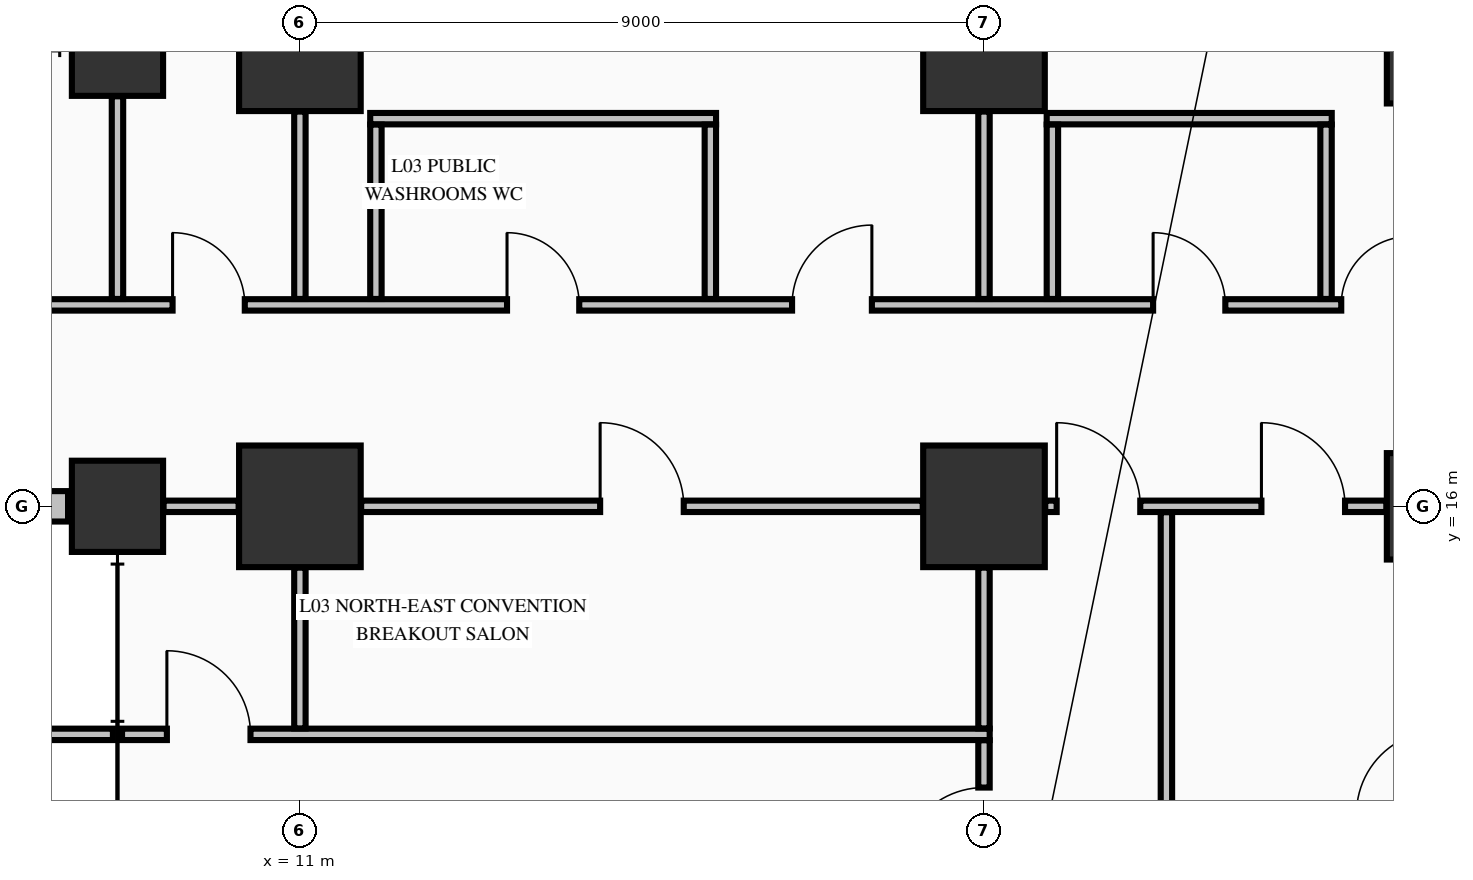
"""IFC4 building model, lengths in metres.
Left out: names, types, materials, properties, quantities, classifications, styles, units other than length and angle.
Written with IfcOpenShell. Run it as: python <this file> out.ifc"""

import sys

from ifc_helpers import new_model, si_unit, direction, frame, frame_2d, origin, origin_2d, place, context, subcontext, project, spatial, rectangle, extrude, element, fill, save


model = new_model("IFC4")
c1 = context("Model", 3, precision=1e-05, world=origin(), true_north=direction((0.0, 1.0)))
c2 = subcontext(c1, "Body", "Model", "MODEL_VIEW")
j1 = project(units=[si_unit("LENGTHUNIT", "METRE"), si_unit("PLANEANGLEUNIT", "RADIAN")], contexts=[c1])
p1 = place(None, origin())
s1 = spatial("IfcSite", under=j1, at=p1, CompositionType="ELEMENT")
p2 = place(p1, origin())
s2 = spatial("IfcBuilding", under=s1, at=p2, CompositionType="ELEMENT")
p3 = place(p2, frame((0.0, 0.0, 16.32)))
s3 = spatial("IfcBuildingStorey", under=s2, at=p3, CompositionType="ELEMENT", Elevation=16.32)
for number, where, z_axis, x_axis in (
    (1, (11.0, 16.0, 0.0), (0.0, 0.0, 1.0), (1.0, 0.0, 0.0)),
    (2, (11.0, 22.0, 0.0), (0.0, 0.0, 1.0), (1.0, 0.0, 0.0)),
    (3, (20.0, 16.0, 0.0), (0.0, 0.0, 1.0), (1.0, 0.0, 0.0)),
    (4, (20.0, 22.0, 0.0), (0.0, 0.0, 1.0), (1.0, 0.0, 0.0)),
):
    element("IfcColumn", number, at=place(p3, frame(where, z_axis=z_axis, x_axis=x_axis)), inside=s3, PredefinedType="COLUMN", context=c2, shape_type="SweptSolid", body=[
        extrude(rectangle(XDim=1.6, YDim=1.6, at=origin_2d()), origin(), (0.0, 0.0, 1.0), 4.99),
    ])
for number, where, z_axis, x_axis in (
    (5, (26.0, 16.0, 0.0), (0.0, 0.0, 1.0), (1.0, 0.0, 0.0)),
    (6, (26.0, 22.0, 0.0), (0.0, 0.0, 1.0), (1.0, 0.0, 0.0)),
):
    element("IfcColumn", number, at=place(p3, frame(where, z_axis=z_axis, x_axis=x_axis)), inside=s3, PredefinedType="COLUMN", context=c2, shape_type="SweptSolid", body=[
        extrude(rectangle(XDim=1.4, YDim=1.4, at=origin_2d()), origin(), (0.0, 0.0, 1.0), 4.99),
    ])
for number, where, z_axis, x_axis in (
    (7, (8.6, 16.0, 0.0), (0.0, 0.0, 1.0), (1.0, 0.0, 0.0)),
    (8, (8.6, 22.0, 0.0), (0.0, 0.0, 1.0), (1.0, 0.0, 0.0)),
):
    element("IfcColumn", number, at=place(p3, frame(where, z_axis=z_axis, x_axis=x_axis)), inside=s3, PredefinedType="COLUMN", context=c2, shape_type="SweptSolid", body=[
        extrude(rectangle(XDim=1.2, YDim=1.2, at=origin_2d()), origin(), (0.0, 0.0, 1.0), 4.99),
    ])
p4 = place(p3, frame((0.73, 16.0, 0.0), z_axis=(0.0, 0.0, 1.0), x_axis=(1.0, 0.0, 0.0)))
e9 = element("IfcWall", 9, at=p4, inside=s3, PredefinedType="STANDARD", context=c2, shape_type="SweptSolid", body=[
    extrude(rectangle(XDim=7.22, YDim=0.4, at=frame_2d((3.61, 0.0))), origin(), (0.0, 0.0, 1.0), 3.332),
])
p5 = place(p3, frame((-8.54, 13.0, 0.0), z_axis=(0.0, 0.0, 1.0), x_axis=(1.0, 0.0, 0.0)))
e10 = element("IfcWall", 10, at=p5, inside=s3, PredefinedType="PARTITIONING", context=c2, shape_type="SweptSolid", body=[
    extrude(rectangle(XDim=17.08, YDim=0.15, at=frame_2d((8.54, 0.0))), origin(), (0.0, 0.0, 1.0), 4.99),
])
p6 = place(p3, frame((8.66, 13.0, 0.0), z_axis=(0.0, 0.0, 1.0), x_axis=(1.0, 0.0, 0.0)))
e11 = element("IfcWall", 11, at=p6, inside=s3, PredefinedType="PARTITIONING", context=c2, shape_type="SweptSolid", body=[
    extrude(rectangle(XDim=11.415, YDim=0.15, at=frame_2d((5.708, 0.0))), origin(), (0.0, 0.0, 1.0), 4.99),
])
p7 = place(p6, frame((0.59, 0.0, 0.0)))
e12 = element("IfcOpeningElement", 12, at=p7, cuts=e11, PredefinedType="OPENING", context=c2, shape_type="SweptSolid", body=[
    extrude(rectangle(XDim=1.1, YDim=2.15, at=frame_2d((0.55, 1.075))), frame((0.0, 0.085, 0.0), z_axis=(0.0, -1.0, 0.0), x_axis=(1.0, 0.0, 0.0)), (0.0, 0.0, 1.0), 0.17),
])
p8 = place(p3, frame((9.206, 16.0, 0.0), z_axis=(0.0, 0.0, 1.0), x_axis=(1.0, 0.0, 0.0)))
e13 = element("IfcWall", 13, at=p8, inside=s3, PredefinedType="PARTITIONING", context=c2, shape_type="SweptSolid", body=[
    extrude(rectangle(XDim=0.988, YDim=0.15, at=frame_2d((0.494, 0.0))), origin(), (0.0, 0.0, 1.0), 3.332),
])
p9 = place(p3, frame((11.806, 16.0, 0.0), z_axis=(0.0, 0.0, 1.0), x_axis=(1.0, 0.0, 0.0)))
e14 = element("IfcWall", 14, at=p9, inside=s3, PredefinedType="PARTITIONING", context=c2, shape_type="SweptSolid", body=[
    extrude(rectangle(XDim=7.388, YDim=0.15, at=frame_2d((3.694, 0.0))), origin(), (0.0, 0.0, 1.0), 3.332),
])
p10 = place(p9, frame((3.144, 0.0, 0.0)))
e15 = element("IfcOpeningElement", 15, at=p10, cuts=e14, PredefinedType="OPENING", context=c2, shape_type="SweptSolid", body=[
    extrude(rectangle(XDim=1.1, YDim=2.15, at=frame_2d((0.55, 1.075))), frame((0.0, 0.085, 0.0), z_axis=(0.0, -1.0, 0.0), x_axis=(1.0, 0.0, 0.0)), (0.0, 0.0, 1.0), 0.17),
])
p11 = place(p3, frame((20.806, 16.0, 0.0), z_axis=(0.0, 0.0, 1.0), x_axis=(1.0, 0.0, 0.0)))
e16 = element("IfcWall", 16, at=p11, inside=s3, PredefinedType="PARTITIONING", context=c2, shape_type="SweptSolid", body=[
    extrude(rectangle(XDim=4.488, YDim=0.15, at=frame_2d((2.244, 0.0))), origin(), (0.0, 0.0, 1.0), 3.332),
])
p12 = place(p11, frame((0.15, 0.0, 0.0)))
e17 = element("IfcOpeningElement", 17, at=p12, cuts=e16, PredefinedType="OPENING", context=c2, shape_type="SweptSolid", body=[
    extrude(rectangle(XDim=1.1, YDim=2.15, at=frame_2d((0.55, 1.075))), frame((0.0, 0.085, 0.0), z_axis=(0.0, -1.0, 0.0), x_axis=(1.0, 0.0, 0.0)), (0.0, 0.0, 1.0), 0.17),
])
p13 = place(p11, frame((2.844, 0.0, 0.0)))
e18 = element("IfcOpeningElement", 18, at=p13, cuts=e16, PredefinedType="OPENING", context=c2, shape_type="SweptSolid", body=[
    extrude(rectangle(XDim=1.1, YDim=2.15, at=frame_2d((0.55, 1.075))), frame((0.0, 0.085, 0.0), z_axis=(0.0, -1.0, 0.0), x_axis=(1.0, 0.0, 0.0)), (0.0, 0.0, 1.0), 0.17),
])
p14 = place(p3, frame((-33.835, 18.65, 0.0), z_axis=(0.0, 0.0, 1.0), x_axis=(1.0, 0.0, 0.0)))
e19 = element("IfcWall", 19, at=p14, inside=s3, PredefinedType="PARTITIONING", context=c2, shape_type="SweptSolid", body=[
    extrude(rectangle(XDim=63.685, YDim=0.15, at=frame_2d((31.843, 0.0))), origin(), (0.0, 0.0, 1.0), 4.99),
])
p15 = place(p14, frame((1.285, 0.0, 0.0)))
e20 = element("IfcOpeningElement", 20, at=p15, cuts=e19, PredefinedType="OPENING", context=c2, shape_type="SweptSolid", body=[
    extrude(rectangle(XDim=1.1, YDim=2.15, at=frame_2d((0.55, 1.075))), frame((0.0, 0.085, 0.0), z_axis=(0.0, -1.0, 0.0), x_axis=(1.0, 0.0, 0.0)), (0.0, 0.0, 1.0), 0.17),
])
p16 = place(p14, frame((5.285, 0.0, 0.0)))
e21 = element("IfcOpeningElement", 21, at=p16, cuts=e19, PredefinedType="OPENING", context=c2, shape_type="SweptSolid", body=[
    extrude(rectangle(XDim=1.1, YDim=2.15, at=frame_2d((0.55, 1.075))), frame((0.0, 0.085, 0.0), z_axis=(0.0, -1.0, 0.0), x_axis=(1.0, 0.0, 0.0)), (0.0, 0.0, 1.0), 0.17),
])
p17 = place(p14, frame((8.785, 0.0, 0.0)))
e22 = element("IfcOpeningElement", 22, at=p17, cuts=e19, PredefinedType="OPENING", context=c2, shape_type="SweptSolid", body=[
    extrude(rectangle(XDim=1.1, YDim=2.15, at=frame_2d((0.55, 1.075))), frame((0.0, 0.085, 0.0), z_axis=(0.0, -1.0, 0.0), x_axis=(1.0, 0.0, 0.0)), (0.0, 0.0, 1.0), 0.17),
])
p18 = place(p14, frame((11.785, 0.0, 0.0)))
e23 = element("IfcOpeningElement", 23, at=p18, cuts=e19, PredefinedType="OPENING", context=c2, shape_type="SweptSolid", body=[
    extrude(rectangle(XDim=1.1, YDim=2.15, at=frame_2d((0.55, 1.075))), frame((0.0, 0.085, 0.0), z_axis=(0.0, -1.0, 0.0), x_axis=(1.0, 0.0, 0.0)), (0.0, 0.0, 1.0), 0.17),
])
p19 = place(p14, frame((15.535, 0.0, 0.0)))
e24 = element("IfcOpeningElement", 24, at=p19, cuts=e19, PredefinedType="OPENING", context=c2, shape_type="SweptSolid", body=[
    extrude(rectangle(XDim=1.1, YDim=2.15, at=frame_2d((0.55, 1.075))), frame((0.0, 0.085, 0.0), z_axis=(0.0, -1.0, 0.0), x_axis=(1.0, 0.0, 0.0)), (0.0, 0.0, 1.0), 0.17),
])
p20 = place(p14, frame((20.035, 0.0, 0.0)))
e25 = element("IfcOpeningElement", 25, at=p20, cuts=e19, PredefinedType="OPENING", context=c2, shape_type="SweptSolid", body=[
    extrude(rectangle(XDim=1.1, YDim=2.15, at=frame_2d((0.55, 1.075))), frame((0.0, 0.085, 0.0), z_axis=(0.0, -1.0, 0.0), x_axis=(1.0, 0.0, 0.0)), (0.0, 0.0, 1.0), 0.17),
])
p21 = place(p14, frame((23.56, 0.0, 0.0)))
e26 = element("IfcOpeningElement", 26, at=p21, cuts=e19, PredefinedType="OPENING", context=c2, shape_type="SweptSolid", body=[
    extrude(rectangle(XDim=0.95, YDim=2.15, at=frame_2d((0.475, 1.075))), frame((0.0, 0.085, 0.0), z_axis=(0.0, -1.0, 0.0), x_axis=(1.0, 0.0, 0.0)), (0.0, 0.0, 1.0), 0.17),
])
p22 = place(p14, frame((28.985, 0.0, 0.0)))
e27 = element("IfcOpeningElement", 27, at=p22, cuts=e19, PredefinedType="OPENING", context=c2, shape_type="SweptSolid", body=[
    extrude(rectangle(XDim=1.1, YDim=2.15, at=frame_2d((0.55, 1.075))), frame((0.0, 0.085, 0.0), z_axis=(0.0, -1.0, 0.0), x_axis=(1.0, 0.0, 0.0)), (0.0, 0.0, 1.0), 0.17),
])
p23 = place(p14, frame((37.585, 0.0, 0.0)))
e28 = element("IfcOpeningElement", 28, at=p23, cuts=e19, PredefinedType="OPENING", context=c2, shape_type="SweptSolid", body=[
    extrude(rectangle(XDim=1.1, YDim=2.15, at=frame_2d((0.55, 1.075))), frame((0.0, 0.085, 0.0), z_axis=(0.0, -1.0, 0.0), x_axis=(1.0, 0.0, 0.0)), (0.0, 0.0, 1.0), 0.17),
])
p24 = place(p14, frame((43.16, 0.0, 0.0)))
e29 = element("IfcOpeningElement", 29, at=p24, cuts=e19, PredefinedType="OPENING", context=c2, shape_type="SweptSolid", body=[
    extrude(rectangle(XDim=0.95, YDim=2.15, at=frame_2d((0.475, 1.075))), frame((0.0, 0.085, 0.0), z_axis=(0.0, -1.0, 0.0), x_axis=(1.0, 0.0, 0.0)), (0.0, 0.0, 1.0), 0.17),
])
p25 = place(p14, frame((61.31, 0.0, 0.0)))
e30 = element("IfcOpeningElement", 30, at=p25, cuts=e19, PredefinedType="OPENING", context=c2, shape_type="SweptSolid", body=[
    extrude(rectangle(XDim=0.95, YDim=2.15, at=frame_2d((0.475, 1.075))), frame((0.0, 0.085, 0.0), z_axis=(0.0, -1.0, 0.0), x_axis=(1.0, 0.0, 0.0)), (0.0, 0.0, 1.0), 0.17),
])
p26 = place(p14, frame((47.56, 0.0, 0.0)))
e31 = element("IfcOpeningElement", 31, at=p26, cuts=e19, PredefinedType="OPENING", context=c2, shape_type="SweptSolid", body=[
    extrude(rectangle(XDim=0.95, YDim=2.15, at=frame_2d((0.475, 1.075))), frame((0.0, 0.085, 0.0), z_axis=(0.0, -1.0, 0.0), x_axis=(1.0, 0.0, 0.0)), (0.0, 0.0, 1.0), 0.17),
])
p27 = place(p14, frame((51.31, 0.0, 0.0)))
e32 = element("IfcOpeningElement", 32, at=p27, cuts=e19, PredefinedType="OPENING", context=c2, shape_type="SweptSolid", body=[
    extrude(rectangle(XDim=1.05, YDim=2.15, at=frame_2d((0.525, 1.075))), frame((0.0, 0.085, 0.0), z_axis=(0.0, -1.0, 0.0), x_axis=(1.0, 0.0, 0.0)), (0.0, 0.0, 1.0), 0.17),
])
p28 = place(p14, frame((56.06, 0.0, 0.0)))
e33 = element("IfcOpeningElement", 33, at=p28, cuts=e19, PredefinedType="OPENING", context=c2, shape_type="SweptSolid", body=[
    extrude(rectangle(XDim=0.95, YDim=2.15, at=frame_2d((0.475, 1.075))), frame((0.0, 0.085, 0.0), z_axis=(0.0, -1.0, 0.0), x_axis=(1.0, 0.0, 0.0)), (0.0, 0.0, 1.0), 0.17),
])
p29 = place(p14, frame((58.535, 0.0, 0.0)))
e34 = element("IfcOpeningElement", 34, at=p29, cuts=e19, PredefinedType="OPENING", context=c2, shape_type="SweptSolid", body=[
    extrude(rectangle(XDim=0.9, YDim=2.15, at=frame_2d((0.45, 1.075))), frame((0.0, 0.085, 0.0), z_axis=(0.0, -1.0, 0.0), x_axis=(1.0, 0.0, 0.0)), (0.0, 0.0, 1.0), 0.17),
])
p30 = place(p3, frame((11.925, 21.1, 0.0), z_axis=(0.0, 0.0, 1.0), x_axis=(1.0, 0.0, 0.0)))
e35 = element("IfcWall", 35, at=p30, inside=s3, PredefinedType="PARTITIONING", context=c2, shape_type="SweptSolid", body=[
    extrude(rectangle(XDim=4.55, YDim=0.15, at=frame_2d((2.275, 0.0))), origin(), (0.0, 0.0, 1.0), 4.99),
])
p31 = place(p3, frame((20.825, 21.1, 0.0), z_axis=(0.0, 0.0, 1.0), x_axis=(1.0, 0.0, 0.0)))
e36 = element("IfcWall", 36, at=p31, inside=s3, PredefinedType="PARTITIONING", context=c2, shape_type="SweptSolid", body=[
    extrude(rectangle(XDim=3.75, YDim=0.15, at=frame_2d((1.875, 0.0))), origin(), (0.0, 0.0, 1.0), 4.99),
])
p32 = place(p3, frame((8.6, 18.728, 0.0), z_axis=(0.0, 0.0, 1.0), x_axis=(0.0, 1.0, 0.0)))
e37 = element("IfcWall", 37, at=p32, inside=s3, PredefinedType="PARTITIONING", context=c2, shape_type="SweptSolid", body=[
    extrude(rectangle(XDim=2.666, YDim=0.15, at=frame_2d((1.333, 0.0))), origin(), (0.0, 0.0, 1.0), 3.332),
])
p33 = place(p3, frame((11.0, 13.078, 0.0), z_axis=(0.0, 0.0, 1.0), x_axis=(0.0, 1.0, 0.0)))
e38 = element("IfcWall", 38, at=p33, inside=s3, PredefinedType="PARTITIONING", context=c2, shape_type="SweptSolid", body=[
    extrude(rectangle(XDim=2.116, YDim=0.15, at=frame_2d((1.058, 0.0))), origin(), (0.0, 0.0, 1.0), 3.332),
])
p34 = place(p3, frame((11.0, 18.728, 0.0), z_axis=(0.0, 0.0, 1.0), x_axis=(0.0, 1.0, 0.0)))
e39 = element("IfcWall", 39, at=p34, inside=s3, PredefinedType="PARTITIONING", context=c2, shape_type="SweptSolid", body=[
    extrude(rectangle(XDim=2.466, YDim=0.15, at=frame_2d((1.233, 0.0))), origin(), (0.0, 0.0, 1.0), 3.332),
])
for number, where, z_axis, x_axis in (
    (40, (12.0, 18.728, 0.0), (0.0, 0.0, 1.0), (0.0, 1.0, 0.0)),
    (41, (16.4, 18.728, 0.0), (0.0, 0.0, 1.0), (0.0, 1.0, 0.0)),
):
    element("IfcWall", number, at=place(p3, frame(where, z_axis=z_axis, x_axis=x_axis)), inside=s3, PredefinedType="PARTITIONING", context=c2, shape_type="SweptSolid", body=[
        extrude(rectangle(XDim=2.294, YDim=0.15, at=frame_2d((1.147, 0.0))), origin(), (0.0, 0.0, 1.0), 4.99),
    ])
p35 = place(p3, frame((20.0, 10.678, 0.0), z_axis=(0.0, 0.0, 1.0), x_axis=(0.0, 1.0, 0.0)))
e42 = element("IfcWall", 42, at=p35, inside=s3, PredefinedType="PARTITIONING", context=c2, shape_type="SweptSolid", body=[
    extrude(rectangle(XDim=2.244, YDim=0.15, at=frame_2d((1.122, 0.0))), origin(), (0.0, 0.0, 1.0), 3.332),
])
p36 = place(p35, frame((0.522, 0.0, 0.0)))
e43 = element("IfcOpeningElement", 43, at=p36, cuts=e42, PredefinedType="OPENING", context=c2, shape_type="SweptSolid", body=[
    extrude(rectangle(XDim=1.1, YDim=2.15, at=frame_2d((0.55, 1.075))), frame((0.0, 0.085, 0.0), z_axis=(0.0, -1.0, 0.0), x_axis=(1.0, 0.0, 0.0)), (0.0, 0.0, 1.0), 0.17),
])
p37 = place(p3, frame((20.0, 13.078, 0.0), z_axis=(0.0, 0.0, 1.0), x_axis=(0.0, 1.0, 0.0)))
e44 = element("IfcWall", 44, at=p37, inside=s3, PredefinedType="PARTITIONING", context=c2, shape_type="SweptSolid", body=[
    extrude(rectangle(XDim=2.116, YDim=0.15, at=frame_2d((1.058, 0.0))), origin(), (0.0, 0.0, 1.0), 3.332),
])
p38 = place(p3, frame((20.0, 18.728, 0.0), z_axis=(0.0, 0.0, 1.0), x_axis=(0.0, 1.0, 0.0)))
e45 = element("IfcWall", 45, at=p38, inside=s3, PredefinedType="PARTITIONING", context=c2, shape_type="SweptSolid", body=[
    extrude(rectangle(XDim=2.466, YDim=0.15, at=frame_2d((1.233, 0.0))), origin(), (0.0, 0.0, 1.0), 3.332),
])
p39 = place(p3, frame((20.9, 18.728, 0.0), z_axis=(0.0, 0.0, 1.0), x_axis=(0.0, 1.0, 0.0)))
e46 = element("IfcWall", 46, at=p39, inside=s3, PredefinedType="PARTITIONING", context=c2, shape_type="SweptSolid", body=[
    extrude(rectangle(XDim=2.294, YDim=0.15, at=frame_2d((1.147, 0.0))), origin(), (0.0, 0.0, 1.0), 4.99),
])
p40 = place(p3, frame((22.4, -16.122, 0.0), z_axis=(0.0, 0.0, 1.0), x_axis=(0.0, 1.0, 0.0)))
e47 = element("IfcWall", 47, at=p40, inside=s3, PredefinedType="PARTITIONING", context=c2, shape_type="SweptSolid", body=[
    extrude(rectangle(XDim=32.044, YDim=0.15, at=frame_2d((16.022, 0.0))), origin(), (0.0, 0.0, 1.0), 4.99),
])
p41 = place(p40, frame((10.522, 0.0, 0.0)))
e48 = element("IfcOpeningElement", 48, at=p41, cuts=e47, PredefinedType="OPENING", context=c2, shape_type="SweptSolid", body=[
    extrude(rectangle(XDim=1.2, YDim=2.15, at=frame_2d((0.6, 1.075))), frame((0.0, 0.085, 0.0), z_axis=(0.0, -1.0, 0.0), x_axis=(1.0, 0.0, 0.0)), (0.0, 0.0, 1.0), 0.17),
])
p42 = place(p40, frame((20.522, 0.0, 0.0)))
e49 = element("IfcOpeningElement", 49, at=p42, cuts=e47, PredefinedType="OPENING", context=c2, shape_type="SweptSolid", body=[
    extrude(rectangle(XDim=1.2, YDim=2.15, at=frame_2d((0.6, 1.075))), frame((0.0, 0.085, 0.0), z_axis=(0.0, -1.0, 0.0), x_axis=(1.0, 0.0, 0.0)), (0.0, 0.0, 1.0), 0.17),
])
p43 = place(p3, frame((24.5, 18.728, 0.0), z_axis=(0.0, 0.0, 1.0), x_axis=(0.0, 1.0, 0.0)))
e50 = element("IfcWall", 50, at=p43, inside=s3, PredefinedType="PARTITIONING", context=c2, shape_type="SweptSolid", body=[
    extrude(rectangle(XDim=2.294, YDim=0.15, at=frame_2d((1.147, 0.0))), origin(), (0.0, 0.0, 1.0), 4.99),
])
p44 = place(p10, origin())
e51 = element("IfcDoor", 51, at=p44, inside=s3, OperationType="SINGLE_SWING_LEFT", PredefinedType="DOOR", context=c2, shape_type="SweptSolid", body=[
    extrude(rectangle(XDim=1.1, YDim=2.15, at=frame_2d((0.55, 1.075))), frame((0.0, 0.025, 0.0), z_axis=(0.0, -1.0, 0.0), x_axis=(1.0, 0.0, 0.0)), (0.0, 0.0, 1.0), 0.05),
])
fill(e15, e51)
p45 = place(p12, origin())
e52 = element("IfcDoor", 52, at=p45, inside=s3, OperationType="SINGLE_SWING_LEFT", PredefinedType="DOOR", context=c2, shape_type="SweptSolid", body=[
    extrude(rectangle(XDim=1.1, YDim=2.15, at=frame_2d((0.55, 1.075))), frame((0.0, 0.025, 0.0), z_axis=(0.0, -1.0, 0.0), x_axis=(1.0, 0.0, 0.0)), (0.0, 0.0, 1.0), 0.05),
])
fill(e17, e52)
p46 = place(p7, origin())
e53 = element("IfcDoor", 53, at=p46, inside=s3, OperationType="SINGLE_SWING_LEFT", PredefinedType="DOOR", context=c2, shape_type="SweptSolid", body=[
    extrude(rectangle(XDim=1.1, YDim=2.15, at=frame_2d((0.55, 1.075))), frame((0.0, 0.025, 0.0), z_axis=(0.0, -1.0, 0.0), x_axis=(1.0, 0.0, 0.0)), (0.0, 0.0, 1.0), 0.05),
])
fill(e12, e53)
p47 = place(p36, origin())
e54 = element("IfcDoor", 54, at=p47, inside=s3, OperationType="SINGLE_SWING_LEFT", PredefinedType="DOOR", context=c2, shape_type="SweptSolid", body=[
    extrude(rectangle(XDim=1.1, YDim=2.15, at=frame_2d((0.55, 1.075))), frame((0.0, 0.025, 0.0), z_axis=(0.0, -1.0, 0.0), x_axis=(1.0, 0.0, 0.0)), (0.0, 0.0, 1.0), 0.05),
])
fill(e43, e54)
p48 = place(p24, origin())
e55 = element("IfcDoor", 55, at=p48, inside=s3, OperationType="SINGLE_SWING_LEFT", PredefinedType="DOOR", context=c2, shape_type="SweptSolid", body=[
    extrude(rectangle(XDim=0.95, YDim=2.15, at=frame_2d((0.475, 1.075))), frame((0.0, 0.025, 0.0), z_axis=(0.0, -1.0, 0.0), x_axis=(1.0, 0.0, 0.0)), (0.0, 0.0, 1.0), 0.05),
])
fill(e29, e55)
p49 = place(p26, origin())
e56 = element("IfcDoor", 56, at=p49, inside=s3, OperationType="SINGLE_SWING_LEFT", PredefinedType="DOOR", context=c2, shape_type="SweptSolid", body=[
    extrude(rectangle(XDim=0.95, YDim=2.15, at=frame_2d((0.475, 1.075))), frame((0.0, 0.025, 0.0), z_axis=(0.0, -1.0, 0.0), x_axis=(1.0, 0.0, 0.0)), (0.0, 0.0, 1.0), 0.05),
])
fill(e31, e56)
p50 = place(p27, origin())
e57 = element("IfcDoor", 57, at=p50, inside=s3, OperationType="SINGLE_SWING_RIGHT", PredefinedType="DOOR", context=c2, shape_type="SweptSolid", body=[
    extrude(rectangle(XDim=1.05, YDim=2.15, at=frame_2d((0.525, 1.075))), frame((0.0, 0.025, 0.0), z_axis=(0.0, -1.0, 0.0), x_axis=(1.0, 0.0, 0.0)), (0.0, 0.0, 1.0), 0.05),
])
fill(e32, e57)
p51 = place(p28, origin())
e58 = element("IfcDoor", 58, at=p51, inside=s3, OperationType="SINGLE_SWING_LEFT", PredefinedType="DOOR", context=c2, shape_type="SweptSolid", body=[
    extrude(rectangle(XDim=0.95, YDim=2.15, at=frame_2d((0.475, 1.075))), frame((0.0, 0.025, 0.0), z_axis=(0.0, -1.0, 0.0), x_axis=(1.0, 0.0, 0.0)), (0.0, 0.0, 1.0), 0.05),
])
fill(e33, e58)
p52 = place(p29, origin())
e59 = element("IfcDoor", 59, at=p52, inside=s3, OperationType="SINGLE_SWING_RIGHT", PredefinedType="DOOR", context=c2, shape_type="SweptSolid", body=[
    extrude(rectangle(XDim=0.9, YDim=2.15, at=frame_2d((0.45, 1.075))), frame((0.0, 0.025, 0.0), z_axis=(0.0, -1.0, 0.0), x_axis=(1.0, 0.0, 0.0)), (0.0, 0.0, 1.0), 0.05),
])
fill(e34, e59)
p53 = place(p13, origin())
e60 = element("IfcDoor", 60, at=p53, inside=s3, OperationType="SINGLE_SWING_LEFT", PredefinedType="DOOR", context=c2, shape_type="SweptSolid", body=[
    extrude(rectangle(XDim=1.1, YDim=2.15, at=frame_2d((0.55, 1.075))), frame((0.0, 0.025, 0.0), z_axis=(0.0, -1.0, 0.0), x_axis=(1.0, 0.0, 0.0)), (0.0, 0.0, 1.0), 0.05),
])
fill(e18, e60)
save(model, sys.argv[1])
